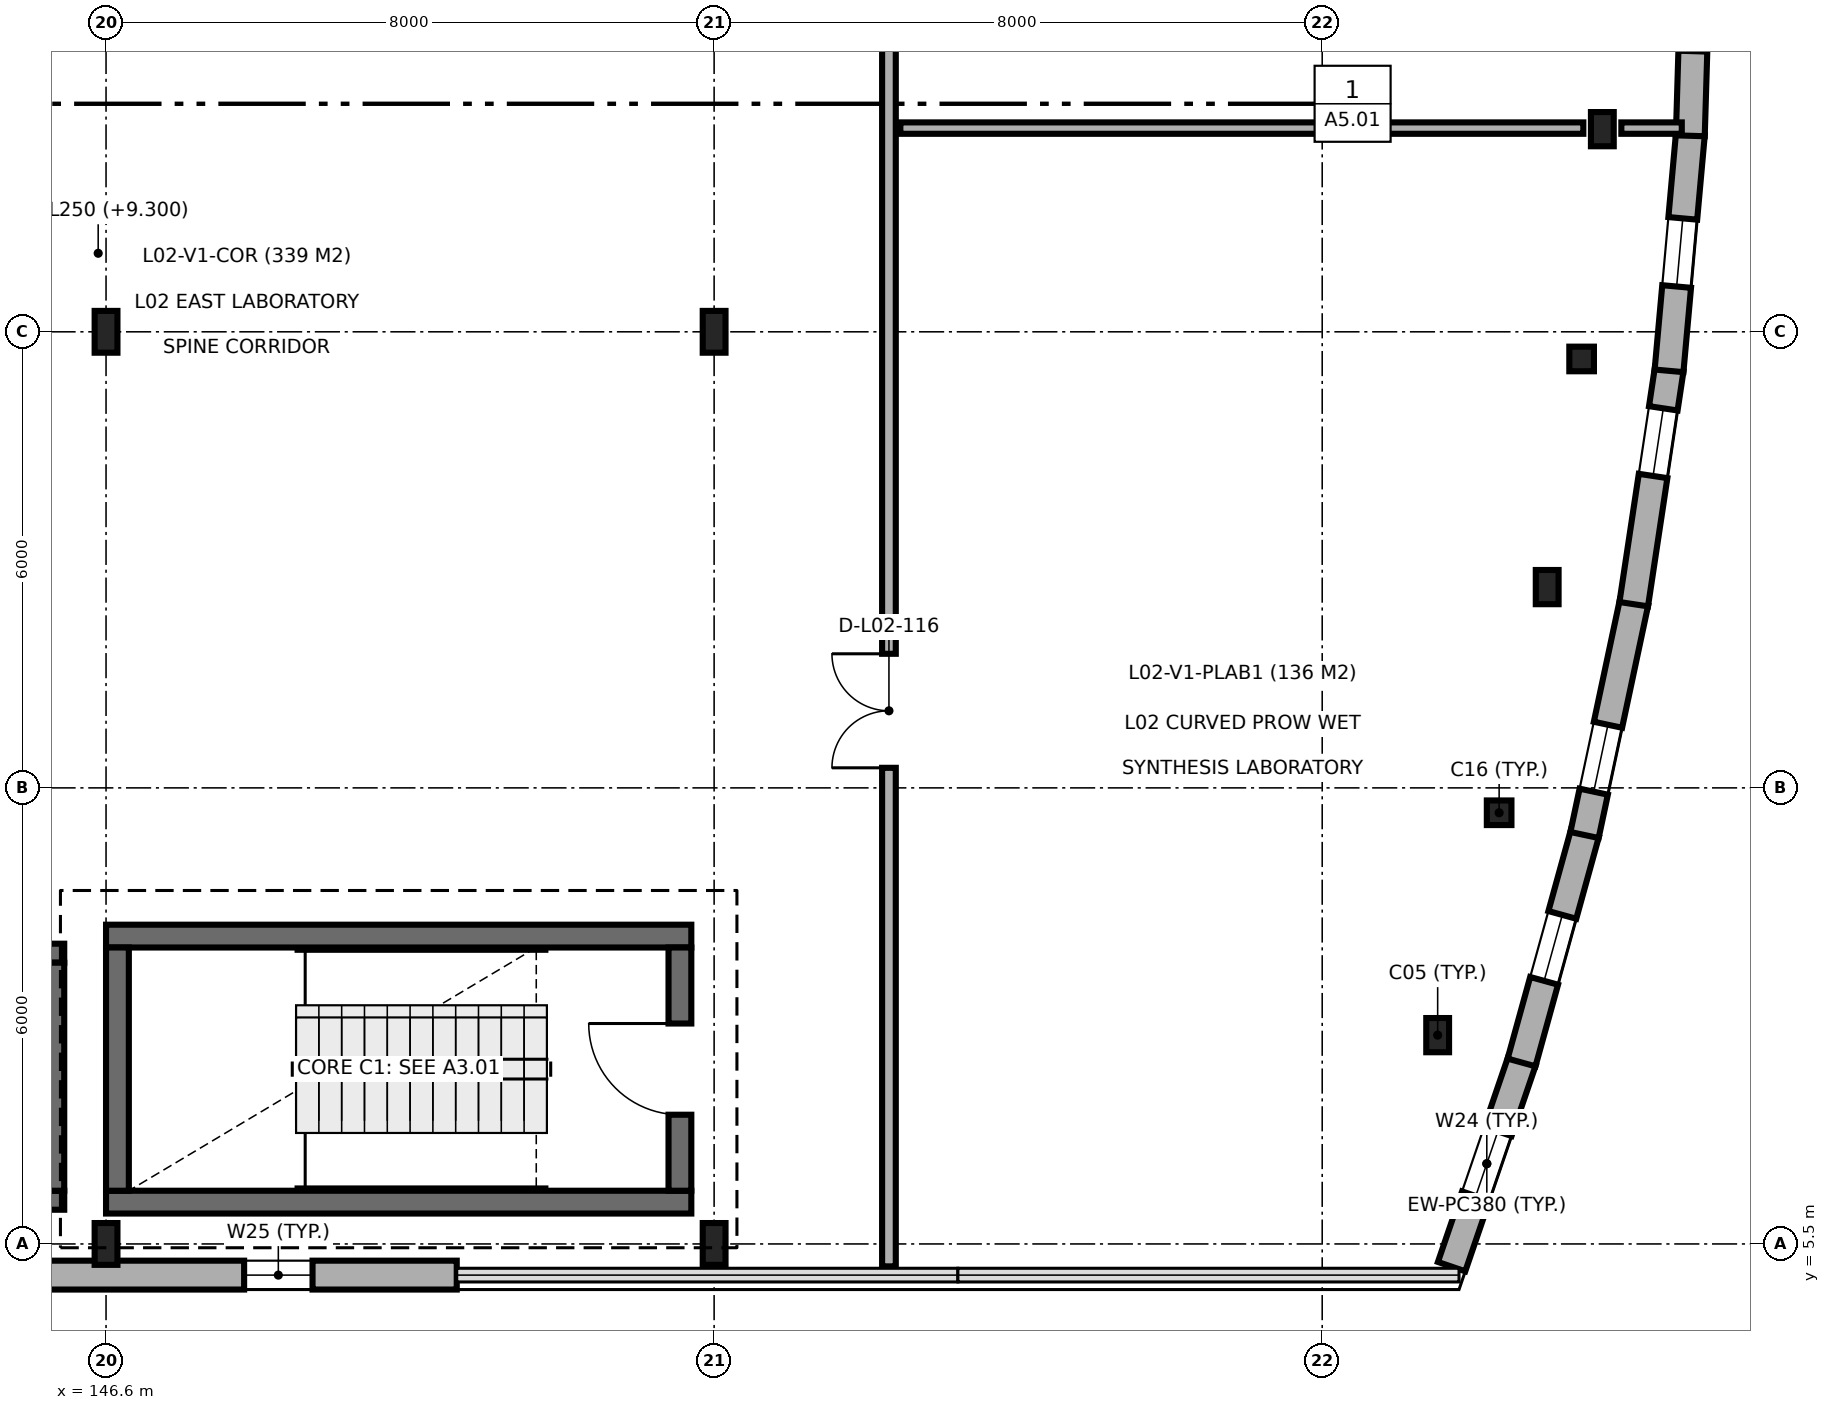
"""IFC4 building model, lengths in metres.
Left out: names, types, materials, properties, quantities, classifications, styles, units other than length and angle.
Written with IfcOpenShell. Run it as: python <this file> out.ifc"""

import sys

from ifc_helpers import new_model, si_unit, direction, frame, frame_2d, origin, origin_2d, place, context, subcontext, project, spatial, rectangle, hollow_circle, i_section, extrude, element, fill, save


model = new_model("IFC4")
c1 = context("Model", 3, precision=1e-05, world=origin(), true_north=direction((0.0, 1.0)))
c2 = subcontext(c1, "Body", "Model", "MODEL_VIEW")
j1 = project(units=[si_unit("LENGTHUNIT", "METRE"), si_unit("PLANEANGLEUNIT", "RADIAN")], contexts=[c1])
p1 = place(None, origin())
s1 = spatial("IfcSite", under=j1, at=p1, CompositionType="ELEMENT")
p2 = place(p1, origin())
s2 = spatial("IfcBuilding", under=s1, at=p2, CompositionType="ELEMENT")
p3 = place(p2, frame((0.0, 0.0, 9.3)))
s3 = spatial("IfcBuildingStorey", under=s2, at=p3, CompositionType="ELEMENT", Elevation=9.3)
for number, where, z_axis, x_axis in (
    (1, (146.6, 5.5, 0.0), (0.0, 0.0, 1.0), (1.0, 0.0, 0.0)),
    (2, (146.6, 17.5, 0.0), (0.0, 0.0, 1.0), (1.0, 0.0, 0.0)),
    (3, (154.6, 5.5, 0.0), (0.0, 0.0, 1.0), (1.0, 0.0, 0.0)),
    (4, (154.6, 17.5, 0.0), (0.0, 0.0, 1.0), (1.0, 0.0, 0.0)),
):
    element("IfcColumn", number, at=place(p3, frame(where, z_axis=z_axis, x_axis=x_axis)), inside=s3, PredefinedType="COLUMN", context=c2, shape_type="SweptSolid", body=[
        extrude(i_section(OverallWidth=0.3, OverallDepth=0.55, WebThickness=0.015, FlangeThickness=0.029, FilletRadius=0.027, at=origin_2d()), origin(), (0.0, 0.0, 1.0), 4.5),
    ])
p4 = place(p3, frame((164.119, 8.247, 0.0), z_axis=(0.0, 0.0, 1.0), x_axis=(1.0, 0.0, 0.0)))
e5 = element("IfcColumn", 5, at=p4, inside=s3, PredefinedType="COLUMN", context=c2, shape_type="SweptSolid", body=[
    extrude(i_section(OverallWidth=0.3, OverallDepth=0.45, WebThickness=0.014, FlangeThickness=0.026, FilletRadius=0.027, at=origin_2d()), origin(), (0.0, 0.0, 1.0), 4.5),
])
p5 = place(p3, frame((164.928, 11.173, 0.0), z_axis=(0.0, 0.0, 1.0), x_axis=(1.0, 0.0, 0.0)))
e6 = element("IfcColumn", 6, at=p5, inside=s3, PredefinedType="COLUMN", context=c2, shape_type="SweptSolid", body=[
    extrude(hollow_circle(Radius=0.162, WallThickness=0.016, at=origin_2d()), origin(), (0.0, 0.0, 1.0), 4.5),
])
p6 = place(p3, frame((165.56, 14.142, 0.0), z_axis=(0.0, 0.0, 1.0), x_axis=(1.0, 0.0, 0.0)))
e7 = element("IfcColumn", 7, at=p6, inside=s3, PredefinedType="COLUMN", context=c2, shape_type="SweptSolid", body=[
    extrude(i_section(OverallWidth=0.3, OverallDepth=0.45, WebThickness=0.014, FlangeThickness=0.026, FilletRadius=0.027, at=origin_2d()), origin(), (0.0, 0.0, 1.0), 4.5),
])
p7 = place(p3, frame((166.013, 17.143, 0.0), z_axis=(0.0, 0.0, 1.0), x_axis=(1.0, 0.0, 0.0)))
e8 = element("IfcColumn", 8, at=p7, inside=s3, PredefinedType="COLUMN", context=c2, shape_type="SweptSolid", body=[
    extrude(hollow_circle(Radius=0.162, WallThickness=0.016, at=origin_2d()), origin(), (0.0, 0.0, 1.0), 4.5),
])
p8 = place(p3, frame((166.285, 20.166, 0.0), z_axis=(0.0, 0.0, 1.0), x_axis=(1.0, 0.0, 0.0)))
e9 = element("IfcColumn", 9, at=p8, inside=s3, PredefinedType="COLUMN", context=c2, shape_type="SweptSolid", body=[
    extrude(i_section(OverallWidth=0.3, OverallDepth=0.45, WebThickness=0.014, FlangeThickness=0.026, FilletRadius=0.027, at=origin_2d()), origin(), (0.0, 0.0, 1.0), 4.5),
])
for number, where, z_axis, x_axis in (
    (10, (146.6, 6.05, 0.0), (0.0, 0.0, 1.0), (1.0, 0.0, 0.0)),
    (11, (154.3, 9.55, 0.0), (0.0, 0.0, 1.0), (-1.0, 0.0, 0.0)),
):
    element("IfcWall", number, at=place(p3, frame(where, z_axis=z_axis, x_axis=x_axis)), inside=s3, PredefinedType="SHEAR", context=c2, shape_type="SweptSolid", body=[
        extrude(rectangle(XDim=7.7, YDim=0.3, at=frame_2d((3.85, 0.0))), origin(), (0.0, 0.0, 1.0), 4.5),
    ])
p9 = place(p3, frame((146.75, 9.4, 0.0), z_axis=(0.0, 0.0, 1.0), x_axis=(0.0, -1.0, 0.0)))
e12 = element("IfcWall", 12, at=p9, inside=s3, PredefinedType="SHEAR", context=c2, shape_type="SweptSolid", body=[
    extrude(rectangle(XDim=3.2, YDim=0.3, at=frame_2d((1.6, 0.0))), origin(), (0.0, 0.0, 1.0), 4.5),
])
p10 = place(p3, frame((154.15, 6.2, 0.0), z_axis=(0.0, 0.0, 1.0), x_axis=(0.0, 1.0, 0.0)))
e13 = element("IfcWall", 13, at=p10, inside=s3, PredefinedType="SHEAR", context=c2, shape_type="SweptSolid", body=[
    extrude(rectangle(XDim=3.2, YDim=0.3, at=frame_2d((1.6, 0.0))), origin(), (0.0, 0.0, 1.0), 4.5),
])
p11 = place(p10, frame((1.0, 0.0, 0.0)))
e14 = element("IfcOpeningElement", 14, at=p11, cuts=e13, PredefinedType="OPENING", context=c2, shape_type="SweptSolid", body=[
    extrude(rectangle(XDim=1.2, YDim=2.15, at=frame_2d((0.6, 1.075))), frame((0.0, 0.16, 0.0), z_axis=(0.0, -1.0, 0.0), x_axis=(1.0, 0.0, 0.0)), (0.0, 0.0, 1.0), 0.32),
])
for number, where, z_axis, x_axis in (
    (15, (143.35, 6.075, 0.0), (0.0, 0.0, 1.0), (1.0, 0.0, 0.0)),
    (16, (146.05, 9.325, 0.0), (0.0, 0.0, 1.0), (-1.0, 0.0, 0.0)),
):
    element("IfcWall", number, at=place(p3, frame(where, z_axis=z_axis, x_axis=x_axis)), inside=s3, PredefinedType="SHEAR", context=c2, shape_type="SweptSolid", body=[
        extrude(rectangle(XDim=2.7, YDim=0.25, at=frame_2d((1.35, 0.0))), origin(), (0.0, 0.0, 1.0), 4.5),
    ])
p12 = place(p3, frame((145.925, 6.2, 0.0), z_axis=(0.0, 0.0, 1.0), x_axis=(0.0, 1.0, 0.0)))
e17 = element("IfcWall", 17, at=p12, inside=s3, PredefinedType="SHEAR", context=c2, shape_type="SweptSolid", body=[
    extrude(rectangle(XDim=3.0, YDim=0.25, at=frame_2d((1.5, 0.0))), origin(), (0.0, 0.0, 1.0), 4.5),
])
p13 = place(p3, frame((138.028, 5.09, 0.0), z_axis=(0.0, 0.0, 1.0), x_axis=(1.0, 0.0, 0.0)))
e18 = element("IfcWall", 18, at=p13, inside=s3, PredefinedType="SOLIDWALL", context=c2, shape_type="SweptSolid", body=[
    extrude(rectangle(XDim=13.186, YDim=0.38, at=frame_2d((6.593, 0.0))), origin(), (0.0, 0.0, 1.0), 4.25),
])
p14 = place(p13, frame((10.389, 0.0, 0.9)))
e19 = element("IfcOpeningElement", 19, at=p14, cuts=e18, PredefinedType="OPENING", context=c2, shape_type="SweptSolid", body=[
    extrude(rectangle(XDim=0.9, YDim=1.4, at=frame_2d((0.45, 0.7))), frame((0.0, 0.2, 0.0), z_axis=(0.0, -1.0, 0.0), x_axis=(1.0, 0.0, 0.0)), (0.0, 0.0, 1.0), 0.4),
])
p15 = place(p3, frame((164.302, 5.201, 0.0), z_axis=(0.0, 0.0, 1.0), x_axis=(0.323739917301, 0.946146112366, 0.0)))
e20 = element("IfcWall", 20, at=p15, inside=s3, PredefinedType="SOLIDWALL", context=c2, shape_type="SweptSolid", body=[
    extrude(rectangle(XDim=2.863, YDim=0.38, at=frame_2d((1.431, 0.0))), origin(), (0.0, 0.0, 1.0), 4.25),
])
p16 = place(p15, frame((0.981, 0.0, 0.9)))
e21 = element("IfcOpeningElement", 21, at=p16, cuts=e20, PredefinedType="OPENING", context=c2, shape_type="SweptSolid", body=[
    extrude(rectangle(XDim=0.9, YDim=1.8, at=frame_2d((0.45, 0.9))), frame((0.0, 0.2, 0.0), z_axis=(0.0, -1.0, 0.0), x_axis=(1.0, 0.0, 0.0)), (0.0, 0.0, 1.0), 0.4),
])
p17 = place(p3, frame((165.222, 7.888, 0.0), z_axis=(0.0, 0.0, 1.0), x_axis=(0.266536691105, 0.963824772609, 0.0)))
e22 = element("IfcWall", 22, at=p17, inside=s3, PredefinedType="SOLIDWALL", context=c2, shape_type="SweptSolid", body=[
    extrude(rectangle(XDim=3.128, YDim=0.38, at=frame_2d((1.564, 0.0))), origin(), (0.0, 0.0, 1.0), 4.25),
])
p18 = place(p17, frame((1.114, 0.0, 0.9)))
e23 = element("IfcOpeningElement", 23, at=p18, cuts=e22, PredefinedType="OPENING", context=c2, shape_type="SweptSolid", body=[
    extrude(rectangle(XDim=0.9, YDim=1.8, at=frame_2d((0.45, 0.9))), frame((0.0, 0.2, 0.0), z_axis=(0.0, -1.0, 0.0), x_axis=(1.0, 0.0, 0.0)), (0.0, 0.0, 1.0), 0.4),
])
p19 = place(p3, frame((166.051, 10.88, 0.0), z_axis=(0.0, 0.0, 1.0), x_axis=(0.208287141705, 0.978067720866, 0.0)))
e24 = element("IfcWall", 24, at=p19, inside=s3, PredefinedType="SOLIDWALL", context=c2, shape_type="SweptSolid", body=[
    extrude(rectangle(XDim=3.128, YDim=0.38, at=frame_2d((1.564, 0.0))), origin(), (0.0, 0.0, 1.0), 4.25),
])
p20 = place(p19, frame((0.583, 0.0, 0.9)))
e25 = element("IfcOpeningElement", 25, at=p20, cuts=e24, PredefinedType="OPENING", context=c2, shape_type="SweptSolid", body=[
    extrude(rectangle(XDim=0.9, YDim=1.8, at=frame_2d((0.45, 0.9))), frame((0.0, 0.2, 0.0), z_axis=(0.0, -1.0, 0.0), x_axis=(1.0, 0.0, 0.0)), (0.0, 0.0, 1.0), 0.4),
])
p21 = place(p3, frame((166.698, 13.917, 0.0), z_axis=(0.0, 0.0, 1.0), x_axis=(0.149218139282, 0.988804301624, 0.0)))
e26 = element("IfcWall", 26, at=p21, inside=s3, PredefinedType="SOLIDWALL", context=c2, shape_type="SweptSolid", body=[
    extrude(rectangle(XDim=3.128, YDim=0.38, at=frame_2d((1.564, 0.0))), origin(), (0.0, 0.0, 1.0), 4.25),
])
p22 = place(p21, frame((1.706, 0.0, 0.9)))
e27 = element("IfcOpeningElement", 27, at=p22, cuts=e26, PredefinedType="OPENING", context=c2, shape_type="SweptSolid", body=[
    extrude(rectangle(XDim=0.9, YDim=1.8, at=frame_2d((0.45, 0.9))), frame((0.0, 0.2, 0.0), z_axis=(0.0, -1.0, 0.0), x_axis=(1.0, 0.0, 0.0)), (0.0, 0.0, 1.0), 0.4),
])
p23 = place(p3, frame((167.163, 16.987, 0.0), z_axis=(0.0, 0.0, 1.0), x_axis=(0.089747627339, 0.995964539222, 0.0)))
e28 = element("IfcWall", 28, at=p23, inside=s3, PredefinedType="SOLIDWALL", context=c2, shape_type="SweptSolid", body=[
    extrude(rectangle(XDim=3.128, YDim=0.38, at=frame_2d((1.564, 0.0))), origin(), (0.0, 0.0, 1.0), 4.25),
])
p24 = place(p23, frame((1.114, 0.0, 0.9)))
e29 = element("IfcOpeningElement", 29, at=p24, cuts=e28, PredefinedType="OPENING", context=c2, shape_type="SweptSolid", body=[
    extrude(rectangle(XDim=0.9, YDim=1.8, at=frame_2d((0.45, 0.9))), frame((0.0, 0.2, 0.0), z_axis=(0.0, -1.0, 0.0), x_axis=(1.0, 0.0, 0.0)), (0.0, 0.0, 1.0), 0.4),
])
p25 = place(p3, frame((167.443, 20.079, 0.0), z_axis=(0.0, 0.0, 1.0), x_axis=(0.02996779607, 0.999550864738, 0.0)))
e30 = element("IfcWall", 30, at=p25, inside=s3, PredefinedType="SOLIDWALL", context=c2, shape_type="SweptSolid", body=[
    extrude(rectangle(XDim=3.128, YDim=0.38, at=frame_2d((1.564, 0.0))), origin(), (0.0, 0.0, 1.0), 4.25),
])
p26 = place(p25, frame((1.114, 0.0, 0.9)))
e31 = element("IfcOpeningElement", 31, at=p26, cuts=e30, PredefinedType="OPENING", context=c2, shape_type="SweptSolid", body=[
    extrude(rectangle(XDim=0.9, YDim=1.8, at=frame_2d((0.45, 0.9))), frame((0.0, 0.2, 0.0), z_axis=(0.0, -1.0, 0.0), x_axis=(1.0, 0.0, 0.0)), (0.0, 0.0, 1.0), 0.4),
])
p27 = place(p3, frame((156.9, 5.205, 0.0), z_axis=(0.0, 0.0, 1.0), x_axis=(0.0, 1.0, 0.0)))
e32 = element("IfcWall", 32, at=p27, inside=s3, PredefinedType="PARTITIONING", context=c2, shape_type="SweptSolid", body=[
    extrude(rectangle(XDim=34.295, YDim=0.18, at=frame_2d((17.147, 0.0))), origin(), (0.0, 0.0, 1.0), 4.25),
])
p28 = place(p27, frame((6.559, 0.0, 0.0)))
e33 = element("IfcOpeningElement", 33, at=p28, cuts=e32, PredefinedType="OPENING", context=c2, shape_type="SweptSolid", body=[
    extrude(rectangle(XDim=1.5, YDim=2.2, at=frame_2d((0.75, 1.1))), frame((0.0, 0.1, 0.0), z_axis=(0.0, -1.0, 0.0), x_axis=(1.0, 0.0, 0.0)), (0.0, 0.0, 1.0), 0.2),
])
p29 = place(p27, frame((17.261, 0.0, 0.0)))
e34 = element("IfcOpeningElement", 34, at=p29, cuts=e32, PredefinedType="OPENING", context=c2, shape_type="SweptSolid", body=[
    extrude(rectangle(XDim=1.1, YDim=2.15, at=frame_2d((0.55, 1.075))), frame((0.0, 0.1, 0.0), z_axis=(0.0, -1.0, 0.0), x_axis=(1.0, 0.0, 0.0)), (0.0, 0.0, 1.0), 0.2),
])
p30 = place(p27, frame((27.343, 0.0, 0.0)))
e35 = element("IfcOpeningElement", 35, at=p30, cuts=e32, PredefinedType="OPENING", context=c2, shape_type="SweptSolid", body=[
    extrude(rectangle(XDim=0.95, YDim=2.1, at=frame_2d((0.475, 1.05))), frame((0.0, 0.1, 0.0), z_axis=(0.0, -1.0, 0.0), x_axis=(1.0, 0.0, 0.0)), (0.0, 0.0, 1.0), 0.2),
])
p31 = place(p3, frame((157.05, 20.18, 0.0), z_axis=(0.0, 0.0, 1.0), x_axis=(1.0, 0.0, 0.0)))
e36 = element("IfcWall", 36, at=p31, inside=s3, PredefinedType="PARTITIONING", context=c2, shape_type="SweptSolid", body=[
    extrude(rectangle(XDim=8.985, YDim=0.15, at=frame_2d((4.493, 0.0))), origin(), (0.0, 0.0, 1.0), 3.75),
])
p32 = place(p3, frame((166.535, 20.18, 0.0), z_axis=(0.0, 0.0, 1.0), x_axis=(1.0, 0.0, 0.0)))
e37 = element("IfcWall", 37, at=p32, inside=s3, PredefinedType="PARTITIONING", context=c2, shape_type="SweptSolid", body=[
    extrude(rectangle(XDim=0.795, YDim=0.15, at=frame_2d((0.398, 0.0))), origin(), (0.0, 0.0, 1.0), 3.75),
])
p33 = place(p11, origin())
e38 = element("IfcDoor", 38, at=p33, inside=s3, OperationType="SINGLE_SWING_RIGHT", PredefinedType="DOOR", context=c2, shape_type="SweptSolid", body=[
    extrude(rectangle(XDim=1.2, YDim=2.15, at=frame_2d((0.6, 1.075))), frame((0.0, 0.025, 0.0), z_axis=(0.0, -1.0, 0.0), x_axis=(1.0, 0.0, 0.0)), (0.0, 0.0, 1.0), 0.05),
])
fill(e14, e38)
p34 = place(p14, origin())
e39 = element("IfcWindow", 39, at=p34, inside=s3, PartitioningType="SINGLE_PANEL", PredefinedType="WINDOW", context=c2, shape_type="SweptSolid", body=[
    extrude(rectangle(XDim=0.9, YDim=1.4, at=frame_2d((0.45, 0.7))), frame((0.0, 0.03, 0.0), z_axis=(0.0, -1.0, 0.0), x_axis=(1.0, 0.0, 0.0)), (0.0, 0.0, 1.0), 0.06),
])
fill(e19, e39)
p35 = place(p16, origin())
e40 = element("IfcWindow", 40, at=p35, inside=s3, PartitioningType="SINGLE_PANEL", PredefinedType="WINDOW", context=c2, shape_type="SweptSolid", body=[
    extrude(rectangle(XDim=0.9, YDim=1.8, at=frame_2d((0.45, 0.9))), frame((0.0, 0.03, 0.0), z_axis=(0.0, -1.0, 0.0), x_axis=(1.0, 0.0, 0.0)), (0.0, 0.0, 1.0), 0.06),
])
fill(e21, e40)
p36 = place(p18, origin())
e41 = element("IfcWindow", 41, at=p36, inside=s3, PartitioningType="SINGLE_PANEL", PredefinedType="WINDOW", context=c2, shape_type="SweptSolid", body=[
    extrude(rectangle(XDim=0.9, YDim=1.8, at=frame_2d((0.45, 0.9))), frame((0.0, 0.03, 0.0), z_axis=(0.0, -1.0, 0.0), x_axis=(1.0, 0.0, 0.0)), (0.0, 0.0, 1.0), 0.06),
])
fill(e23, e41)
p37 = place(p20, origin())
e42 = element("IfcWindow", 42, at=p37, inside=s3, PartitioningType="SINGLE_PANEL", PredefinedType="WINDOW", context=c2, shape_type="SweptSolid", body=[
    extrude(rectangle(XDim=0.9, YDim=1.8, at=frame_2d((0.45, 0.9))), frame((0.0, 0.03, 0.0), z_axis=(0.0, -1.0, 0.0), x_axis=(1.0, 0.0, 0.0)), (0.0, 0.0, 1.0), 0.06),
])
fill(e25, e42)
p38 = place(p22, origin())
e43 = element("IfcWindow", 43, at=p38, inside=s3, PartitioningType="SINGLE_PANEL", PredefinedType="WINDOW", context=c2, shape_type="SweptSolid", body=[
    extrude(rectangle(XDim=0.9, YDim=1.8, at=frame_2d((0.45, 0.9))), frame((0.0, 0.03, 0.0), z_axis=(0.0, -1.0, 0.0), x_axis=(1.0, 0.0, 0.0)), (0.0, 0.0, 1.0), 0.06),
])
fill(e27, e43)
p39 = place(p24, origin())
e44 = element("IfcWindow", 44, at=p39, inside=s3, PartitioningType="SINGLE_PANEL", PredefinedType="WINDOW", context=c2, shape_type="SweptSolid", body=[
    extrude(rectangle(XDim=0.9, YDim=1.8, at=frame_2d((0.45, 0.9))), frame((0.0, 0.03, 0.0), z_axis=(0.0, -1.0, 0.0), x_axis=(1.0, 0.0, 0.0)), (0.0, 0.0, 1.0), 0.06),
])
fill(e29, e44)
p40 = place(p28, origin())
e45 = element("IfcDoor", 45, at=p40, inside=s3, OperationType="DOUBLE_DOOR_SINGLE_SWING", PredefinedType="DOOR", context=c2, shape_type="SweptSolid", body=[
    extrude(rectangle(XDim=1.5, YDim=2.2, at=frame_2d((0.75, 1.1))), frame((0.0, 0.025, 0.0), z_axis=(0.0, -1.0, 0.0), x_axis=(1.0, 0.0, 0.0)), (0.0, 0.0, 1.0), 0.05),
])
fill(e33, e45)
save(model, sys.argv[1])
